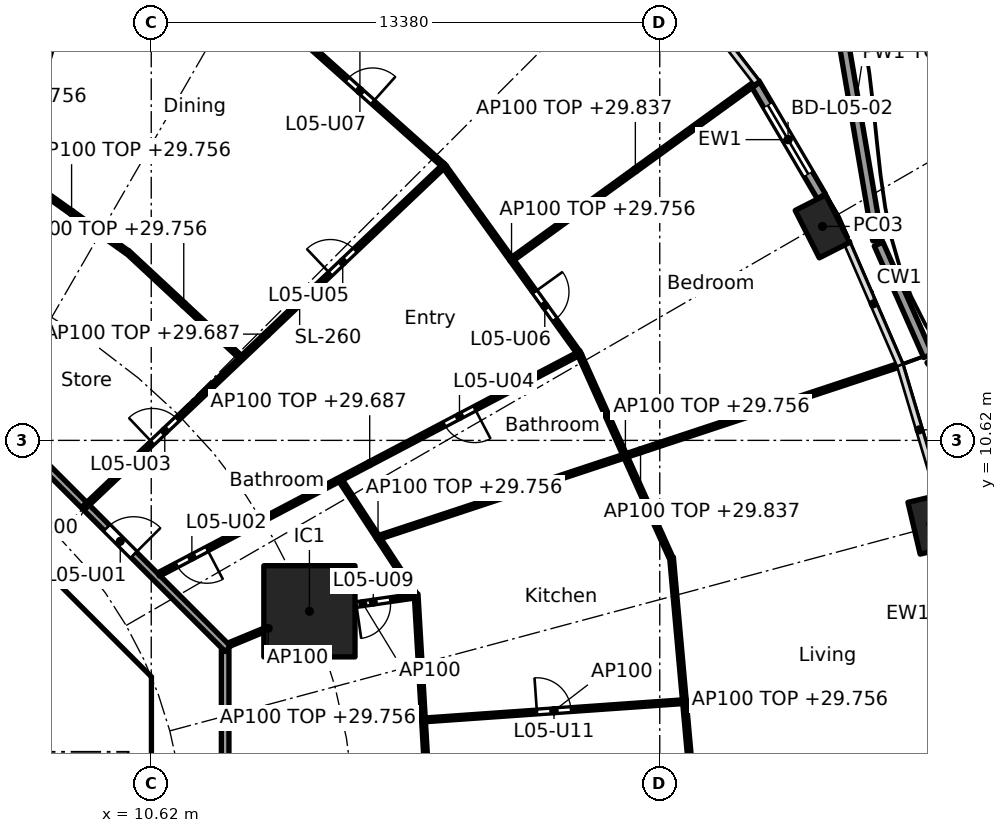
"""IFC4 building model, lengths in metres.
Left out: names, types, materials, properties, quantities, classifications, styles, units other than length and angle.
Written with IfcOpenShell. Run it as: python <this file> out.ifc"""

import sys

from ifc_helpers import new_model, si_unit, direction, frame, frame_2d, origin, origin_2d, place, context, subcontext, project, spatial, polyline, rectangle, hollow_rectangle, outline, extrude, element, fill, save


model = new_model("IFC4")
c1 = context("Model", 3, precision=1e-05, world=origin(), true_north=direction((0.0, 1.0)))
c2 = subcontext(c1, "Body", "Model", "MODEL_VIEW")
j1 = project(units=[si_unit("LENGTHUNIT", "METRE"), si_unit("PLANEANGLEUNIT", "RADIAN")], contexts=[c1])
p1 = place(None, origin())
s1 = spatial("IfcSite", under=j1, at=p1, CompositionType="ELEMENT")
p2 = place(p1, origin())
s2 = spatial("IfcBuilding", under=s1, at=p2, CompositionType="ELEMENT")
p3 = place(p2, frame((0.0, 0.0, 27.0)))
s3 = spatial("IfcBuildingStorey", under=s2, at=p3, CompositionType="ELEMENT", Elevation=27.0)
for number, where, z_axis, x_axis in (
    (1, (31.129, 8.412, 0.0), (0.0, 0.0, 1.0), (-0.229, 0.973, 0.0)),
    (2, (28.282, 16.25, 0.0), (0.0, 0.0, 1.0), (-0.452, 0.892, 0.0)),
):
    element("IfcColumn", number, at=place(p3, frame(where, z_axis=z_axis, x_axis=x_axis)), inside=s3, PredefinedType="COLUMN", context=c2, shape_type="SweptSolid", body=[
        extrude(hollow_rectangle(XDim=1.4, YDim=0.9, WallThickness=0.05, at=origin_2d()), origin(), (0.0, 0.0, 1.0), 3.7),
    ])
p4 = place(p3, frame((14.782, 6.123, 0.0), z_axis=(0.0, 0.0, 1.0), x_axis=(1.0, 0.0, 0.0)))
e3 = element("IfcColumn", 3, at=p4, inside=s3, PredefinedType="COLUMN", context=c2, shape_type="SweptSolid", body=[
    extrude(rectangle(XDim=2.4, YDim=2.4, at=origin_2d()), origin(), (0.0, 0.0, 1.0), 3.7),
])
p5 = place(p3, frame((26.5, 20.026, 0.0), z_axis=(0.0, 0.0, 1.0), x_axis=(0.506311160839, -0.862350861546, 0.0)))
e4 = element("IfcWall", 4, at=p5, inside=s3, PredefinedType="SOLIDWALL", context=c2, shape_type="SweptSolid", body=[
    extrude(rectangle(XDim=3.462, YDim=0.25, at=frame_2d((1.731, 0.0))), origin(), (0.0, 0.0, 1.0), 3.44),
])
p6 = place(p5, frame((0.681, 0.0, 0.0)))
e5 = element("IfcOpeningElement", 5, at=p6, cuts=e4, PredefinedType="OPENING", context=c2, shape_type="SweptSolid", body=[
    extrude(rectangle(XDim=2.1, YDim=2.4, at=frame_2d((1.05, 1.2))), frame((0.0, 0.135, 0.0), z_axis=(0.0, -1.0, 0.0), x_axis=(1.0, 0.0, 0.0)), (0.0, 0.0, 1.0), 0.27),
])
p7 = place(p3, frame((34.461, 8.48, 0.0), z_axis=(0.0, 0.0, 1.0), x_axis=(-0.615882240598, 0.787838223061, 0.0)))
e6 = element("IfcWall", 6, at=p7, inside=s3, PredefinedType="PARAPET", context=c2, shape_type="SweptSolid", body=[
    extrude(rectangle(XDim=5.409, YDim=0.25, at=frame_2d((2.705, 0.0))), origin(), (0.0, 0.0, 1.0), 1.1),
])
p8 = place(p3, frame((31.059, 12.849, 0.0), z_axis=(0.0, 0.0, 1.0), x_axis=(-0.40486170938, 0.914377928582, 0.0)))
e7 = element("IfcWall", 7, at=p8, inside=s3, PredefinedType="PARAPET", context=c2, shape_type="SweptSolid", body=[
    extrude(rectangle(XDim=3.212, YDim=0.25, at=frame_2d((1.606, 0.0))), origin(), (0.0, 0.0, 1.0), 1.1),
])
p9 = place(p3, frame((29.727, 15.892, 0.0), z_axis=(0.0, 0.0, 1.0), x_axis=(-0.168107215642, 0.985768717321, 0.0)))
e8 = element("IfcWall", 8, at=p9, inside=s3, PredefinedType="PARAPET", context=c2, shape_type="SweptSolid", body=[
    extrude(rectangle(XDim=7.001, YDim=0.25, at=frame_2d((3.501, 0.0))), origin(), (0.0, 0.0, 1.0), 1.1),
])
p10 = place(p3, frame((9.988, 4.613, 0.0), z_axis=(0.0, 0.0, 1.0), x_axis=(-0.707106781187, 0.707106781187, 0.0)))
e9 = element("IfcWall", 9, at=p10, inside=s3, PredefinedType="SHEAR", context=c2, shape_type="SweptSolid", body=[
    extrude(rectangle(XDim=7.602, YDim=0.6, at=frame_2d((3.801, 0.0))), origin(), (0.0, 0.0, 1.0), 3.44),
])
p11 = place(p10, frame((3.201, 0.0, 0.0)))
e10 = element("IfcOpeningElement", 10, at=p11, cuts=e9, PredefinedType="OPENING", context=c2, shape_type="SweptSolid", body=[
    extrude(rectangle(XDim=1.2, YDim=2.1, at=frame_2d((0.6, 1.05))), frame((0.0, 0.31, 0.0), z_axis=(0.0, -1.0, 0.0), x_axis=(1.0, 0.0, 0.0)), (0.0, 0.0, 1.0), 0.62),
])
p12 = place(p3, frame((6.7, 4.0, 0.0), z_axis=(0.0, 0.0, 1.0), x_axis=(1.0, 0.0, 0.0)))
e11 = element("IfcWall", 11, at=p12, inside=s3, PredefinedType="SOLIDWALL", context=c2, shape_type="SweptSolid", body=[
    extrude(rectangle(XDim=3.325, YDim=0.2, at=frame_2d((1.662, 0.0))), origin(), (0.0, 0.0, 1.0), 3.44),
])
p13 = place(p12, frame((1.25, 0.0, 0.0)))
e12 = element("IfcOpeningElement", 12, at=p13, cuts=e11, PredefinedType="OPENING", context=c2, shape_type="SweptSolid", body=[
    extrude(rectangle(XDim=1.1, YDim=2.1, at=frame_2d((0.55, 1.05))), frame((0.0, 0.11, 0.0), z_axis=(0.0, -1.0, 0.0), x_axis=(1.0, 0.0, 0.0)), (0.0, 0.0, 1.0), 0.22),
])
p14 = place(p3, origin())
e13 = element("IfcWall", 13, at=p14, inside=s3, PredefinedType="SHEAR", context=c2, shape_type="SweptSolid", body=[
    extrude(outline(polyline([(9.776, -4.401), (10.025, -4.152), (10.025, -3.801), (10.025, 4.152), (9.776, 4.401), (10.2, 4.825), (10.625, 4.401), (10.625, -4.401), (10.2, -4.825), (9.776, -4.401)])), origin(), (0.0, 0.0, 1.0), 3.44),
])
p15 = place(p3, frame((6.137, 14.83, 0.0), z_axis=(0.0, 0.0, 1.0), x_axis=(0.27985745069, 0.960041565399, 0.0)))
e14 = element("IfcWall", 14, at=p15, inside=s3, PredefinedType="PARTITIONING", context=c2, shape_type="SweptSolid", body=[
    extrude(rectangle(XDim=16.705, YDim=0.2, at=frame_2d((8.353, 0.0))), origin(), (0.0, 0.0, 1.0), 2.756),
])
p16 = place(p3, frame((12.565, -5.104, 0.0), z_axis=(0.0, 0.0, 1.0), x_axis=(0.0, 1.0, 0.0)))
e15 = element("IfcWall", 15, at=p16, inside=s3, PredefinedType="PARTITIONING", context=c2, shape_type="SweptSolid", body=[
    extrude(rectangle(XDim=10.209, YDim=0.2, at=frame_2d((5.104, 0.0))), origin(), (0.0, 0.0, 1.0), 3.44),
])
p17 = place(p3, frame((12.635, 5.134, 0.0), z_axis=(0.0, 0.0, 1.0), x_axis=(-0.707106781187, 0.707106781187, 0.0)))
e16 = element("IfcWall", 16, at=p17, inside=s3, PredefinedType="PARTITIONING", context=c2, shape_type="SweptSolid", body=[
    extrude(rectangle(XDim=10.609, YDim=0.2, at=frame_2d((5.305, 0.0))), origin(), (0.0, 0.0, 1.0), 3.44),
])
p18 = place(p17, frame((3.503, 0.0, 0.0)))
e17 = element("IfcOpeningElement", 17, at=p18, cuts=e16, PredefinedType="OPENING", context=c2, shape_type="SweptSolid", body=[
    extrude(rectangle(XDim=1.0, YDim=2.1, at=frame_2d((0.5, 1.05))), frame((0.0, 0.11, 0.0), z_axis=(0.0, -1.0, 0.0), x_axis=(1.0, 0.0, 0.0)), (0.0, 0.0, 1.0), 0.22),
])
p19 = place(p3, frame((17.971, 0.05, 0.0), z_axis=(0.0, 0.0, 1.0), x_axis=(-0.058476853647, 0.998288764631, 0.0)))
e18 = element("IfcWall", 18, at=p19, inside=s3, PredefinedType="PARTITIONING", context=c2, shape_type="SweptSolid", body=[
    extrude(rectangle(XDim=6.538, YDim=0.1, at=frame_2d((3.269, 0.0))), origin(), (0.0, 0.0, 1.0), 2.756),
])
p20 = place(p19, frame((1.159, 0.0, 0.0)))
e19 = element("IfcOpeningElement", 19, at=p20, cuts=e18, PredefinedType="OPENING", context=c2, shape_type="SweptSolid", body=[
    extrude(rectangle(XDim=0.9, YDim=2.1, at=frame_2d((0.45, 1.05))), frame((0.0, 0.06, 0.0), z_axis=(0.0, -1.0, 0.0), x_axis=(1.0, 0.0, 0.0)), (0.0, 0.0, 1.0), 0.12),
])
p21 = place(p3, frame((24.982, 0.05, 0.0), z_axis=(0.0, 0.0, 1.0), x_axis=(-0.089444214321, 0.995991833563, 0.0)))
e20 = element("IfcWall", 20, at=p21, inside=s3, PredefinedType="PARTITIONING", context=c2, shape_type="SweptSolid", body=[
    extrude(rectangle(XDim=7.523, YDim=0.1, at=frame_2d((3.761, 0.0))), origin(), (0.0, 0.0, 1.0), 2.756),
])
p22 = place(p3, frame((17.833, 3.267, 0.0), z_axis=(0.0, 0.0, 1.0), x_axis=(0.997537184513, 0.070139614438, 0.0)))
e21 = element("IfcWall", 21, at=p22, inside=s3, PredefinedType="PARTITIONING", context=c2, shape_type="SweptSolid", body=[
    extrude(rectangle(XDim=6.784, YDim=0.1, at=frame_2d((3.392, 0.0))), origin(), (0.0, 0.0, 1.0), 3.44),
])
p23 = place(p22, frame((2.942, 0.0, 0.0)))
e22 = element("IfcOpeningElement", 22, at=p23, cuts=e21, PredefinedType="OPENING", context=c2, shape_type="SweptSolid", body=[
    extrude(rectangle(XDim=0.9, YDim=2.1, at=frame_2d((0.45, 1.05))), frame((0.0, 0.06, 0.0), z_axis=(0.0, -1.0, 0.0), x_axis=(1.0, 0.0, 0.0)), (0.0, 0.0, 1.0), 0.12),
])
p24 = place(p3, frame((12.657, 5.243, 0.0), z_axis=(0.0, 0.0, 1.0), x_axis=(0.923864733477, 0.382719158442, 0.0)))
e23 = element("IfcWall", 23, at=p24, inside=s3, PredefinedType="PARTITIONING", context=c2, shape_type="SweptSolid", body=[
    extrude(rectangle(XDim=2.25, YDim=0.1, at=frame_2d((1.125, 0.0))), origin(), (0.0, 0.0, 1.0), 3.44),
])
p25 = place(p3, frame((14.832, 6.13, 0.0), z_axis=(0.0, 0.0, 1.0), x_axis=(0.989840446863, 0.142182593007, 0.0)))
e24 = element("IfcWall", 24, at=p25, inside=s3, PredefinedType="PARTITIONING", context=c2, shape_type="SweptSolid", body=[
    extrude(rectangle(XDim=2.739, YDim=0.1, at=frame_2d((1.369, 0.0))), origin(), (0.0, 0.0, 1.0), 3.44),
])
p26 = place(p25, frame((1.197, 0.0, 0.0)))
e25 = element("IfcOpeningElement", 25, at=p26, cuts=e24, PredefinedType="OPENING", context=c2, shape_type="SweptSolid", body=[
    extrude(rectangle(XDim=0.9, YDim=2.1, at=frame_2d((0.45, 1.05))), frame((0.0, 0.06, 0.0), z_axis=(0.0, -1.0, 0.0), x_axis=(1.0, 0.0, 0.0)), (0.0, 0.0, 1.0), 0.12),
])
p27 = place(p3, frame((17.564, 6.569, 0.0), z_axis=(0.0, 0.0, 1.0), x_axis=(-0.547641765292, 0.836712911881, 0.0)))
e26 = element("IfcWall", 26, at=p27, inside=s3, PredefinedType="PARTITIONING", context=c2, shape_type="SweptSolid", body=[
    extrude(rectangle(XDim=3.57, YDim=0.1, at=frame_2d((1.785, 0.0))), origin(), (0.0, 0.0, 1.0), 2.756),
])
p28 = place(p3, frame((24.293, 7.538, 0.0), z_axis=(0.0, 0.0, 1.0), x_axis=(-0.410197710154, 0.911996622025, 0.0)))
e27 = element("IfcWall", 27, at=p28, inside=s3, PredefinedType="PARTITIONING", context=c2, shape_type="SweptSolid", body=[
    extrude(rectangle(XDim=5.837, YDim=0.1, at=frame_2d((2.918, 0.0))), origin(), (0.0, 0.0, 1.0), 2.756),
])
p29 = place(p3, frame((16.635, 8.078, 0.0), z_axis=(0.0, 0.0, 1.0), x_axis=(0.949412285442, 0.314032342684, 0.0)))
e28 = element("IfcWall", 28, at=p29, inside=s3, PredefinedType="PARTITIONING", context=c2, shape_type="SweptSolid", body=[
    extrude(rectangle(XDim=14.451, YDim=0.1, at=frame_2d((7.226, 0.0))), origin(), (0.0, 0.0, 1.0), 2.837),
])
p30 = place(p3, frame((10.813, 7.091, 0.0), z_axis=(0.0, 0.0, 1.0), x_axis=(0.885182649479, 0.465243674928, 0.0)))
e29 = element("IfcWall", 29, at=p30, inside=s3, PredefinedType="PARTITIONING", context=c2, shape_type="SweptSolid", body=[
    extrude(rectangle(XDim=12.551, YDim=0.1, at=frame_2d((6.275, 0.0))), origin(), (0.0, 0.0, 1.0), 2.687),
])
p31 = place(p30, frame((0.539, 0.0, 0.0)))
e30 = element("IfcOpeningElement", 30, at=p31, cuts=e29, PredefinedType="OPENING", context=c2, shape_type="SweptSolid", body=[
    extrude(rectangle(XDim=0.9, YDim=2.1, at=frame_2d((0.45, 1.05))), frame((0.0, 0.06, 0.0), z_axis=(0.0, -1.0, 0.0), x_axis=(1.0, 0.0, 0.0)), (0.0, 0.0, 1.0), 0.12),
])
p32 = place(p30, frame((8.494, 0.0, 0.0)))
e31 = element("IfcOpeningElement", 31, at=p32, cuts=e29, PredefinedType="OPENING", context=c2, shape_type="SweptSolid", body=[
    extrude(rectangle(XDim=0.9, YDim=2.1, at=frame_2d((0.45, 1.05))), frame((0.0, 0.06, 0.0), z_axis=(0.0, -1.0, 0.0), x_axis=(1.0, 0.0, 0.0)), (0.0, 0.0, 1.0), 0.12),
])
p33 = place(p3, frame((21.849, 12.948, 0.0), z_axis=(0.0, 0.0, 1.0), x_axis=(-0.584563700282, 0.811347817099, 0.0)))
e32 = element("IfcWall", 32, at=p33, inside=s3, PredefinedType="PARTITIONING", context=c2, shape_type="SweptSolid", body=[
    extrude(rectangle(XDim=5.984, YDim=0.1, at=frame_2d((2.992, 0.0))), origin(), (0.0, 0.0, 1.0), 2.756),
])
p34 = place(p33, frame((1.046, 0.0, 0.0)))
e33 = element("IfcOpeningElement", 33, at=p34, cuts=e32, PredefinedType="OPENING", context=c2, shape_type="SweptSolid", body=[
    extrude(rectangle(XDim=0.9, YDim=2.1, at=frame_2d((0.45, 1.05))), frame((0.0, 0.06, 0.0), z_axis=(0.0, -1.0, 0.0), x_axis=(1.0, 0.0, 0.0)), (0.0, 0.0, 1.0), 0.12),
])
p35 = place(p3, frame((20.141, 15.405, 0.0), z_axis=(0.0, 0.0, 1.0), x_axis=(0.809834895779, 0.58665785734, 0.0)))
e34 = element("IfcWall", 34, at=p35, inside=s3, PredefinedType="PARTITIONING", context=c2, shape_type="SweptSolid", body=[
    extrude(rectangle(XDim=7.945, YDim=0.1, at=frame_2d((3.973, 0.0))), origin(), (0.0, 0.0, 1.0), 2.837),
])
p36 = place(p3, frame((8.957, 8.953, 0.0), z_axis=(0.0, 0.0, 1.0), x_axis=(0.725250022034, 0.688485588476, 0.0)))
e35 = element("IfcWall", 35, at=p36, inside=s3, PredefinedType="PARTITIONING", context=c2, shape_type="SweptSolid", body=[
    extrude(rectangle(XDim=12.963, YDim=0.1, at=frame_2d((6.481, 0.0))), origin(), (0.0, 0.0, 1.0), 2.687),
])
p37 = place(p36, frame((2.333, 0.0, 0.0)))
e36 = element("IfcOpeningElement", 36, at=p37, cuts=e35, PredefinedType="OPENING", context=c2, shape_type="SweptSolid", body=[
    extrude(rectangle(XDim=0.9, YDim=2.1, at=frame_2d((0.45, 1.05))), frame((0.0, 0.06, 0.0), z_axis=(0.0, -1.0, 0.0), x_axis=(1.0, 0.0, 0.0)), (0.0, 0.0, 1.0), 0.12),
])
p38 = place(p36, frame((8.79, 0.0, 0.0)))
e37 = element("IfcOpeningElement", 37, at=p38, cuts=e35, PredefinedType="OPENING", context=c2, shape_type="SweptSolid", body=[
    extrude(rectangle(XDim=0.9, YDim=2.1, at=frame_2d((0.45, 1.05))), frame((0.0, 0.06, 0.0), z_axis=(0.0, -1.0, 0.0), x_axis=(1.0, 0.0, 0.0)), (0.0, 0.0, 1.0), 0.12),
])
p39 = place(p3, frame((12.958, 12.82, 0.0), z_axis=(0.0, 0.0, 1.0), x_axis=(-0.732028724098, 0.681273768096, 0.0)))
e38 = element("IfcWall", 38, at=p39, inside=s3, PredefinedType="PARTITIONING", context=c2, shape_type="SweptSolid", body=[
    extrude(rectangle(XDim=4.05, YDim=0.1, at=frame_2d((2.025, 0.0))), origin(), (0.0, 0.0, 1.0), 2.756),
])
p40 = place(p3, frame((18.285, 17.877, 0.0), z_axis=(0.0, 0.0, 1.0), x_axis=(-0.745806142791, 0.666163041136, 0.0)))
e39 = element("IfcWall", 39, at=p40, inside=s3, PredefinedType="PARTITIONING", context=c2, shape_type="SweptSolid", body=[
    extrude(rectangle(XDim=5.831, YDim=0.1, at=frame_2d((2.915, 0.0))), origin(), (0.0, 0.0, 1.0), 2.756),
])
p41 = place(p40, frame((2.465, 0.0, 0.0)))
e40 = element("IfcOpeningElement", 40, at=p41, cuts=e39, PredefinedType="OPENING", context=c2, shape_type="SweptSolid", body=[
    extrude(rectangle(XDim=0.9, YDim=2.1, at=frame_2d((0.45, 1.05))), frame((0.0, 0.06, 0.0), z_axis=(0.0, -1.0, 0.0), x_axis=(1.0, 0.0, 0.0)), (0.0, 0.0, 1.0), 0.12),
])
p42 = place(p3, frame((9.989, 15.574, 0.0), z_axis=(0.0, 0.0, 1.0), x_axis=(-0.81492039338, 0.57957290521, 0.0)))
e41 = element("IfcWall", 41, at=p42, inside=s3, PredefinedType="PARTITIONING", context=c2, shape_type="SweptSolid", body=[
    extrude(rectangle(XDim=3.594, YDim=0.1, at=frame_2d((1.797, 0.0))), origin(), (0.0, 0.0, 1.0), 2.756),
])
p43 = place(p6, origin())
e42 = element("IfcDoor", 42, at=p43, inside=s3, OperationType="SLIDING_TO_LEFT", PredefinedType="DOOR", context=c2, shape_type="SweptSolid", body=[
    extrude(rectangle(XDim=2.1, YDim=2.4, at=frame_2d((1.05, 1.2))), frame((0.0, 0.025, 0.0), z_axis=(0.0, -1.0, 0.0), x_axis=(1.0, 0.0, 0.0)), (0.0, 0.0, 1.0), 0.05),
])
fill(e5, e42)
p44 = place(p13, frame((1.1, 0.0, 0.0), x_axis=(-1.0, 0.0, 0.0)))
e43 = element("IfcDoor", 43, at=p44, inside=s3, OperationType="SINGLE_SWING_LEFT", PredefinedType="DOOR", context=c2, shape_type="SweptSolid", body=[
    extrude(rectangle(XDim=1.1, YDim=2.1, at=frame_2d((0.55, 1.05))), frame((0.0, 0.025, 0.0), z_axis=(0.0, -1.0, 0.0), x_axis=(1.0, 0.0, 0.0)), (0.0, 0.0, 1.0), 0.05),
])
fill(e12, e43)
p45 = place(p18, frame((1.0, 0.0, 0.0), x_axis=(-1.0, 0.0, 0.0)))
e44 = element("IfcDoor", 44, at=p45, inside=s3, OperationType="SINGLE_SWING_RIGHT", PredefinedType="DOOR", context=c2, shape_type="SweptSolid", body=[
    extrude(rectangle(XDim=1.0, YDim=2.1, at=frame_2d((0.5, 1.05))), frame((0.0, 0.025, 0.0), z_axis=(0.0, -1.0, 0.0), x_axis=(1.0, 0.0, 0.0)), (0.0, 0.0, 1.0), 0.05),
])
fill(e17, e44)
p46 = place(p31, frame((0.9, 0.0, 0.0), x_axis=(-1.0, 0.0, 0.0)))
e45 = element("IfcDoor", 45, at=p46, inside=s3, OperationType="SINGLE_SWING_LEFT", PredefinedType="DOOR", context=c2, shape_type="SweptSolid", body=[
    extrude(rectangle(XDim=0.9, YDim=2.1, at=frame_2d((0.45, 1.05))), frame((0.0, 0.025, 0.0), z_axis=(0.0, -1.0, 0.0), x_axis=(1.0, 0.0, 0.0)), (0.0, 0.0, 1.0), 0.05),
])
fill(e30, e45)
p47 = place(p37, origin())
e46 = element("IfcDoor", 46, at=p47, inside=s3, OperationType="SINGLE_SWING_LEFT", PredefinedType="DOOR", context=c2, shape_type="SweptSolid", body=[
    extrude(rectangle(XDim=0.9, YDim=2.1, at=frame_2d((0.45, 1.05))), frame((0.0, 0.025, 0.0), z_axis=(0.0, -1.0, 0.0), x_axis=(1.0, 0.0, 0.0)), (0.0, 0.0, 1.0), 0.05),
])
fill(e36, e46)
p48 = place(p32, frame((0.9, 0.0, 0.0), x_axis=(-1.0, 0.0, 0.0)))
e47 = element("IfcDoor", 47, at=p48, inside=s3, OperationType="SINGLE_SWING_LEFT", PredefinedType="DOOR", context=c2, shape_type="SweptSolid", body=[
    extrude(rectangle(XDim=0.9, YDim=2.1, at=frame_2d((0.45, 1.05))), frame((0.0, 0.025, 0.0), z_axis=(0.0, -1.0, 0.0), x_axis=(1.0, 0.0, 0.0)), (0.0, 0.0, 1.0), 0.05),
])
fill(e31, e47)
p49 = place(p38, origin())
e48 = element("IfcDoor", 48, at=p49, inside=s3, OperationType="SINGLE_SWING_LEFT", PredefinedType="DOOR", context=c2, shape_type="SweptSolid", body=[
    extrude(rectangle(XDim=0.9, YDim=2.1, at=frame_2d((0.45, 1.05))), frame((0.0, 0.025, 0.0), z_axis=(0.0, -1.0, 0.0), x_axis=(1.0, 0.0, 0.0)), (0.0, 0.0, 1.0), 0.05),
])
fill(e37, e48)
p50 = place(p34, frame((0.9, 0.0, 0.0), x_axis=(-1.0, 0.0, 0.0)))
e49 = element("IfcDoor", 49, at=p50, inside=s3, OperationType="SINGLE_SWING_LEFT", PredefinedType="DOOR", context=c2, shape_type="SweptSolid", body=[
    extrude(rectangle(XDim=0.9, YDim=2.1, at=frame_2d((0.45, 1.05))), frame((0.0, 0.025, 0.0), z_axis=(0.0, -1.0, 0.0), x_axis=(1.0, 0.0, 0.0)), (0.0, 0.0, 1.0), 0.05),
])
fill(e33, e49)
p51 = place(p41, frame((0.9, 0.0, 0.0), x_axis=(-1.0, 0.0, 0.0)))
e50 = element("IfcDoor", 50, at=p51, inside=s3, OperationType="SINGLE_SWING_RIGHT", PredefinedType="DOOR", context=c2, shape_type="SweptSolid", body=[
    extrude(rectangle(XDim=0.9, YDim=2.1, at=frame_2d((0.45, 1.05))), frame((0.0, 0.025, 0.0), z_axis=(0.0, -1.0, 0.0), x_axis=(1.0, 0.0, 0.0)), (0.0, 0.0, 1.0), 0.05),
])
fill(e40, e50)
p52 = place(p26, frame((0.9, 0.0, 0.0), x_axis=(-1.0, 0.0, 0.0)))
e51 = element("IfcDoor", 51, at=p52, inside=s3, OperationType="SINGLE_SWING_RIGHT", PredefinedType="DOOR", context=c2, shape_type="SweptSolid", body=[
    extrude(rectangle(XDim=0.9, YDim=2.1, at=frame_2d((0.45, 1.05))), frame((0.0, 0.025, 0.0), z_axis=(0.0, -1.0, 0.0), x_axis=(1.0, 0.0, 0.0)), (0.0, 0.0, 1.0), 0.05),
])
fill(e25, e51)
p53 = place(p23, origin())
e52 = element("IfcDoor", 52, at=p53, inside=s3, OperationType="SINGLE_SWING_LEFT", PredefinedType="DOOR", context=c2, shape_type="SweptSolid", body=[
    extrude(rectangle(XDim=0.9, YDim=2.1, at=frame_2d((0.45, 1.05))), frame((0.0, 0.025, 0.0), z_axis=(0.0, -1.0, 0.0), x_axis=(1.0, 0.0, 0.0)), (0.0, 0.0, 1.0), 0.05),
])
fill(e22, e52)
save(model, sys.argv[1])
